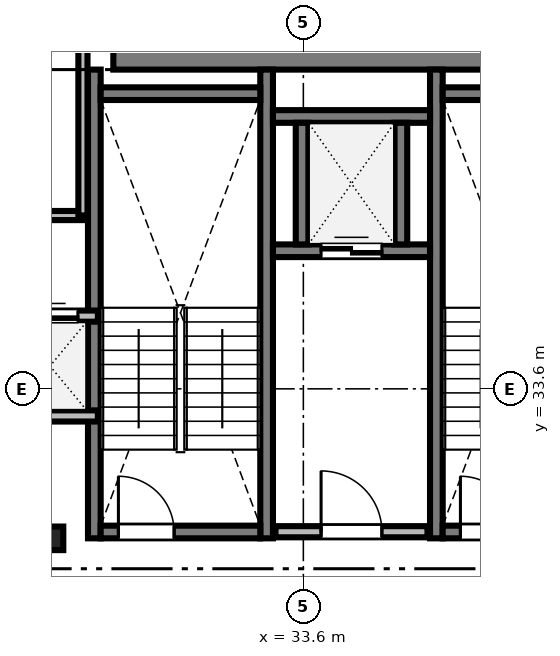
"""IFC4 building model, lengths in metres.
Left out: names, types, materials, properties, quantities, classifications, styles, units other than length and angle.
Written with IfcOpenShell. Run it as: python <this file> out.ifc"""

import sys

from ifc_helpers import new_model, si_unit, direction, frame, frame_2d, origin, origin_2d, place, context, subcontext, project, spatial, rectangle, i_section, extrude, source, transform, mapped, element, fill, save


model = new_model("IFC4")
c1 = context("Model", 3, precision=1e-05, world=origin(), true_north=direction((0.0, 1.0)))
c2 = subcontext(c1, "Body", "Model", "MODEL_VIEW")
j1 = project(units=[si_unit("LENGTHUNIT", "METRE"), si_unit("PLANEANGLEUNIT", "RADIAN")], contexts=[c1])
p1 = place(None, origin())
s1 = spatial("IfcSite", under=j1, at=p1, CompositionType="ELEMENT")
p2 = place(p1, origin())
s2 = spatial("IfcBuilding", under=s1, at=p2, CompositionType="ELEMENT")
p3 = place(p2, frame((0.0, 0.0, 144.6)))
s3 = spatial("IfcBuildingStorey", under=s2, at=p3, CompositionType="ELEMENT", Elevation=144.6)
m1 = source(origin(), c2, "Body", "SweptSolid", [
    extrude(rectangle(XDim=17.52, YDim=0.8, at=frame_2d((8.76, 0.0))), origin(), (0.0, 0.0, 1.0), 3.46),
])
p4 = place(p3, frame((29.85, 40.3, 0.0), z_axis=(0.0, 0.0, 1.0), x_axis=(1.0, 0.0, 0.0)))
e1 = element("IfcWall", 1, at=p4, inside=s3, PredefinedType="SHEAR", context=c2, shape_type="MappedRepresentation", body=[
    mapped(m1, transform((0.0, 0.0, 0.0), scale=1.0)),
])
m2 = source(origin(), c2, "Body", "SweptSolid", [
    extrude(i_section(OverallWidth=0.424, OverallDepth=0.465, WebThickness=0.035, FlangeThickness=0.056, FilletRadius=0.015, at=origin_2d()), origin(), (0.0, 0.0, 1.0), 3.46),
])
p5 = place(p3, frame((28.65, 30.65, 0.0), z_axis=(0.0, 0.0, 1.0), x_axis=(1.0, 0.0, 0.0)))
e2 = element("IfcColumn", 2, at=p5, inside=s3, PredefinedType="COLUMN", context=c2, shape_type="MappedRepresentation", body=[
    mapped(m2, transform((0.0, 0.0, 0.0), scale=1.0)),
])
m3 = source(origin(), c2, "Body", "SweptSolid", [
    extrude(rectangle(XDim=9.25, YDim=0.25, at=frame_2d((4.625, 0.0))), origin(), (0.0, 0.0, 1.0), 3.5),
])
for number, where, z_axis, x_axis in (
    (3, (29.475, 30.65, 0.0), (0.0, 0.0, 1.0), (0.0, 1.0, 0.0)),
    (4, (32.875, 30.65, 0.0), (0.0, 0.0, 1.0), (0.0, 1.0, 0.0)),
):
    element("IfcWall", number, at=place(p3, frame(where, z_axis=z_axis, x_axis=x_axis)), inside=s3, PredefinedType="SOLIDWALL", context=c2, shape_type="MappedRepresentation", body=[
        mapped(m3, transform((0.0, 0.0, 0.0), scale=1.0)),
    ])
m4 = source(origin(), c2, "Body", "SweptSolid", [
    extrude(rectangle(XDim=3.15, YDim=0.25, at=frame_2d((1.575, 0.0))), origin(), (0.0, 0.0, 1.0), 3.5),
])
p6 = place(p3, frame((29.6, 39.425, 0.0), z_axis=(0.0, 0.0, 1.0), x_axis=(1.0, 0.0, 0.0)))
e5 = element("IfcWall", 5, at=p6, inside=s3, PredefinedType="SOLIDWALL", context=c2, shape_type="MappedRepresentation", body=[
    mapped(m4, transform((0.0, 0.0, 0.0), scale=1.0)),
])
p7 = place(p3, frame((29.6, 30.775, 0.0), z_axis=(0.0, 0.0, 1.0), x_axis=(1.0, 0.0, 0.0)))
e6 = element("IfcWall", 6, at=p7, inside=s3, PredefinedType="SOLIDWALL", context=c2, shape_type="MappedRepresentation", body=[
    mapped(m4, transform((0.0, 0.0, 0.0), scale=1.0)),
])
m5 = source(origin(), c2, "Body", "SweptSolid", [
    extrude(rectangle(XDim=1.1, YDim=2.2, at=frame_2d((0.55, 1.1))), frame((0.0, 0.135, 0.0), z_axis=(0.0, -1.0, 0.0), x_axis=(1.0, 0.0, 0.0)), (0.0, 0.0, 1.0), 0.27),
])
p8 = place(p7, frame((0.35, 0.0, 0.0)))
e7 = element("IfcOpeningElement", 7, at=p8, cuts=e6, PredefinedType="OPENING", context=c2, shape_type="MappedRepresentation", body=[
    mapped(m5, transform((0.0, 0.0, 0.0), scale=1.0)),
])
p9 = place(p3, frame((36.225, 30.65, 0.0), z_axis=(0.0, 0.0, 1.0), x_axis=(0.0, 1.0, 0.0)))
e8 = element("IfcWall", 8, at=p9, inside=s3, PredefinedType="SOLIDWALL", context=c2, shape_type="MappedRepresentation", body=[
    mapped(m3, transform((0.0, 0.0, 0.0), scale=1.0)),
])
p10 = place(p3, frame((36.35, 39.425, 0.0), z_axis=(0.0, 0.0, 1.0), x_axis=(1.0, 0.0, 0.0)))
e9 = element("IfcWall", 9, at=p10, inside=s3, PredefinedType="SOLIDWALL", context=c2, shape_type="MappedRepresentation", body=[
    mapped(m4, transform((0.0, 0.0, 0.0), scale=1.0)),
])
p11 = place(p3, frame((36.35, 30.775, 0.0), z_axis=(0.0, 0.0, 1.0), x_axis=(1.0, 0.0, 0.0)))
e10 = element("IfcWall", 10, at=p11, inside=s3, PredefinedType="SOLIDWALL", context=c2, shape_type="MappedRepresentation", body=[
    mapped(m4, transform((0.0, 0.0, 0.0), scale=1.0)),
])
p12 = place(p11, frame((0.35, 0.0, 0.0)))
e11 = element("IfcOpeningElement", 11, at=p12, cuts=e10, PredefinedType="OPENING", context=c2, shape_type="MappedRepresentation", body=[
    mapped(m5, transform((0.0, 0.0, 0.0), scale=1.0)),
])
m6 = source(origin(), c2, "Body", "SweptSolid", [
    extrude(rectangle(XDim=3.0, YDim=0.22, at=frame_2d((1.5, 0.0))), origin(), (0.0, 0.0, 1.0), 3.46),
])
p13 = place(p3, frame((33.05, 30.78, 0.0), z_axis=(0.0, 0.0, 1.0), x_axis=(1.0, 0.0, 0.0)))
e12 = element("IfcWall", 12, at=p13, inside=s3, PredefinedType="SOLIDWALL", context=c2, shape_type="MappedRepresentation", body=[
    mapped(m6, transform((0.0, 0.0, 0.0), scale=1.0)),
])
m7 = source(origin(), c2, "Body", "SweptSolid", [
    extrude(rectangle(XDim=1.2, YDim=2.2, at=frame_2d((0.6, 1.1))), frame((0.0, 0.12, 0.0), z_axis=(0.0, -1.0, 0.0), x_axis=(1.0, 0.0, 0.0)), (0.0, 0.0, 1.0), 0.24),
])
p14 = place(p13, frame((0.9, 0.0, 0.0)))
e13 = element("IfcOpeningElement", 13, at=p14, cuts=e12, PredefinedType="OPENING", context=c2, shape_type="MappedRepresentation", body=[
    mapped(m7, transform((0.0, 0.0, 0.0), scale=1.0)),
])
m8 = source(origin(), c2, "Body", "SweptSolid", [
    extrude(rectangle(XDim=1.89, YDim=0.22, at=frame_2d((0.945, 0.0))), origin(), (0.0, 0.0, 1.0), 3.46),
])
p15 = place(p3, frame((27.655, 33.065, 0.0), z_axis=(0.0, 0.0, 1.0), x_axis=(1.0, 0.0, 0.0)))
e14 = element("IfcWall", 14, at=p15, inside=s3, PredefinedType="SOLIDWALL", context=c2, shape_type="MappedRepresentation", body=[
    mapped(m8, transform((0.0, 0.0, 0.0), scale=1.0)),
])
p16 = place(p3, frame((27.655, 35.035, 0.0), z_axis=(0.0, 0.0, 1.0), x_axis=(1.0, 0.0, 0.0)))
e15 = element("IfcWall", 15, at=p16, inside=s3, PredefinedType="SOLIDWALL", context=c2, shape_type="MappedRepresentation", body=[
    mapped(m8, transform((0.0, 0.0, 0.0), scale=1.0)),
])
m9 = source(origin(), c2, "Body", "SweptSolid", [
    extrude(rectangle(XDim=1.1, YDim=2.2, at=frame_2d((0.55, 1.1))), frame((0.0, 0.12, 0.0), z_axis=(0.0, -1.0, 0.0), x_axis=(1.0, 0.0, 0.0)), (0.0, 0.0, 1.0), 0.24),
])
p17 = place(p16, frame((0.395, 0.0, 0.0)))
e16 = element("IfcOpeningElement", 16, at=p17, cuts=e15, PredefinedType="OPENING", context=c2, shape_type="MappedRepresentation", body=[
    mapped(m9, transform((0.0, 0.0, 0.0), scale=1.0)),
])
m10 = source(origin(), c2, "Body", "SweptSolid", [
    extrude(rectangle(XDim=3.1, YDim=0.25, at=frame_2d((1.55, 0.0))), origin(), (0.0, 0.0, 1.0), 3.46),
])
p18 = place(p3, frame((33.0, 36.325, 0.0), z_axis=(0.0, 0.0, 1.0), x_axis=(1.0, 0.0, 0.0)))
e17 = element("IfcWall", 17, at=p18, inside=s3, PredefinedType="SOLIDWALL", context=c2, shape_type="MappedRepresentation", body=[
    mapped(m10, transform((0.0, 0.0, 0.0), scale=1.0)),
])
m11 = source(origin(), c2, "Body", "SweptSolid", [
    extrude(rectangle(XDim=1.2, YDim=2.25, at=frame_2d((0.6, 1.125))), frame((0.0, 0.135, 0.0), z_axis=(0.0, -1.0, 0.0), x_axis=(1.0, 0.0, 0.0)), (0.0, 0.0, 1.0), 0.27),
])
p19 = place(p18, frame((0.95, 0.0, 0.0)))
e18 = element("IfcOpeningElement", 18, at=p19, cuts=e17, PredefinedType="OPENING", context=c2, shape_type="MappedRepresentation", body=[
    mapped(m11, transform((0.0, 0.0, 0.0), scale=1.0)),
])
p20 = place(p3, frame((33.0, 38.975, 0.0), z_axis=(0.0, 0.0, 1.0), x_axis=(1.0, 0.0, 0.0)))
e19 = element("IfcWall", 19, at=p20, inside=s3, PredefinedType="SOLIDWALL", context=c2, shape_type="MappedRepresentation", body=[
    mapped(m10, transform((0.0, 0.0, 0.0), scale=1.0)),
])
m12 = source(origin(), c2, "Body", "SweptSolid", [
    extrude(rectangle(XDim=2.4, YDim=0.25, at=frame_2d((1.2, 0.0))), origin(), (0.0, 0.0, 1.0), 3.46),
])
for number, where, z_axis, x_axis in (
    (20, (33.575, 36.45, 0.0), (0.0, 0.0, 1.0), (0.0, 1.0, 0.0)),
    (21, (35.525, 36.45, 0.0), (0.0, 0.0, 1.0), (0.0, 1.0, 0.0)),
):
    element("IfcWall", number, at=place(p3, frame(where, z_axis=z_axis, x_axis=x_axis)), inside=s3, PredefinedType="SOLIDWALL", context=c2, shape_type="MappedRepresentation", body=[
        mapped(m12, transform((0.0, 0.0, 0.0), scale=1.0)),
    ])
m13 = source(origin(), c2, "Body", "SweptSolid", [
    extrude(rectangle(XDim=22.328, YDim=0.18, at=frame_2d((11.164, 0.0))), origin(), (0.0, 0.0, 1.0), 2.702),
])
p21 = place(p3, frame((6.922, 37.02, 0.0), z_axis=(0.0, 0.0, 1.0), x_axis=(1.0, 0.0, 0.0)))
e22 = element("IfcWall", 22, at=p21, inside=s3, PredefinedType="PARTITIONING", context=c2, shape_type="MappedRepresentation", body=[
    mapped(m13, transform((0.0, 0.0, 0.0), scale=1.0)),
])
m14 = source(origin(), c2, "Body", "SweptSolid", [
    extrude(rectangle(XDim=1.05, YDim=2.2, at=frame_2d((0.525, 1.1))), frame((0.0, 0.1, 0.0), z_axis=(0.0, -1.0, 0.0), x_axis=(1.0, 0.0, 0.0)), (0.0, 0.0, 1.0), 0.2),
])
p22 = place(p21, frame((14.928, 0.0, 0.0)))
e23 = element("IfcOpeningElement", 23, at=p22, cuts=e22, PredefinedType="OPENING", context=c2, shape_type="MappedRepresentation", body=[
    mapped(m14, transform((0.0, 0.0, 0.0), scale=1.0)),
])
m15 = source(origin(), c2, "Body", "SweptSolid", [
    extrude(rectangle(XDim=11.45, YDim=0.18, at=frame_2d((5.725, 0.0))), origin(), (0.0, 0.0, 1.0), 2.702),
])
p23 = place(p3, frame((29.25, 37.02, 0.0), z_axis=(0.0, 0.0, 1.0), x_axis=(0.0, 1.0, 0.0)))
e24 = element("IfcWall", 24, at=p23, inside=s3, PredefinedType="PARTITIONING", context=c2, shape_type="MappedRepresentation", body=[
    mapped(m15, transform((0.0, 0.0, 0.0), scale=1.0)),
])
m16 = source(origin(), c2, "Body", "SweptSolid", [
    extrude(rectangle(XDim=1.1, YDim=2.2, at=frame_2d((0.55, 1.1))), frame((0.0, 0.025, 0.0), z_axis=(0.0, -1.0, 0.0), x_axis=(1.0, 0.0, 0.0)), (0.0, 0.0, 1.0), 0.05),
])
p24 = place(p8, origin())
e25 = element("IfcDoor", 25, at=p24, inside=s3, OperationType="SINGLE_SWING_LEFT", PredefinedType="DOOR", context=c2, shape_type="MappedRepresentation", body=[
    mapped(m16, transform((0.0, 0.0, 0.0), scale=1.0)),
])
fill(e7, e25)
p25 = place(p12, origin())
e26 = element("IfcDoor", 26, at=p25, inside=s3, OperationType="SINGLE_SWING_LEFT", PredefinedType="DOOR", context=c2, shape_type="MappedRepresentation", body=[
    mapped(m16, transform((0.0, 0.0, 0.0), scale=1.0)),
])
fill(e11, e26)
m17 = source(origin(), c2, "Body", "SweptSolid", [
    extrude(rectangle(XDim=1.2, YDim=2.2, at=frame_2d((0.6, 1.1))), frame((0.0, 0.025, 0.0), z_axis=(0.0, -1.0, 0.0), x_axis=(1.0, 0.0, 0.0)), (0.0, 0.0, 1.0), 0.05),
])
p26 = place(p14, origin())
e27 = element("IfcDoor", 27, at=p26, inside=s3, OperationType="SINGLE_SWING_LEFT", PredefinedType="DOOR", context=c2, shape_type="MappedRepresentation", body=[
    mapped(m17, transform((0.0, 0.0, 0.0), scale=1.0)),
])
fill(e13, e27)
p27 = place(p17, origin())
e28 = element("IfcDoor", 28, at=p27, inside=s3, OperationType="DOUBLE_DOOR_SLIDING", PredefinedType="DOOR", context=c2, shape_type="MappedRepresentation", body=[
    mapped(m16, transform((0.0, 0.0, 0.0), scale=1.0)),
])
fill(e16, e28)
m18 = source(origin(), c2, "Body", "SweptSolid", [
    extrude(rectangle(XDim=1.2, YDim=2.25, at=frame_2d((0.6, 1.125))), frame((0.0, 0.025, 0.0), z_axis=(0.0, -1.0, 0.0), x_axis=(1.0, 0.0, 0.0)), (0.0, 0.0, 1.0), 0.05),
])
p28 = place(p19, origin())
e29 = element("IfcDoor", 29, at=p28, inside=s3, OperationType="DOUBLE_DOOR_SLIDING", PredefinedType="DOOR", context=c2, shape_type="MappedRepresentation", body=[
    mapped(m18, transform((0.0, 0.0, 0.0), scale=1.0)),
])
fill(e18, e29)
save(model, sys.argv[1])
